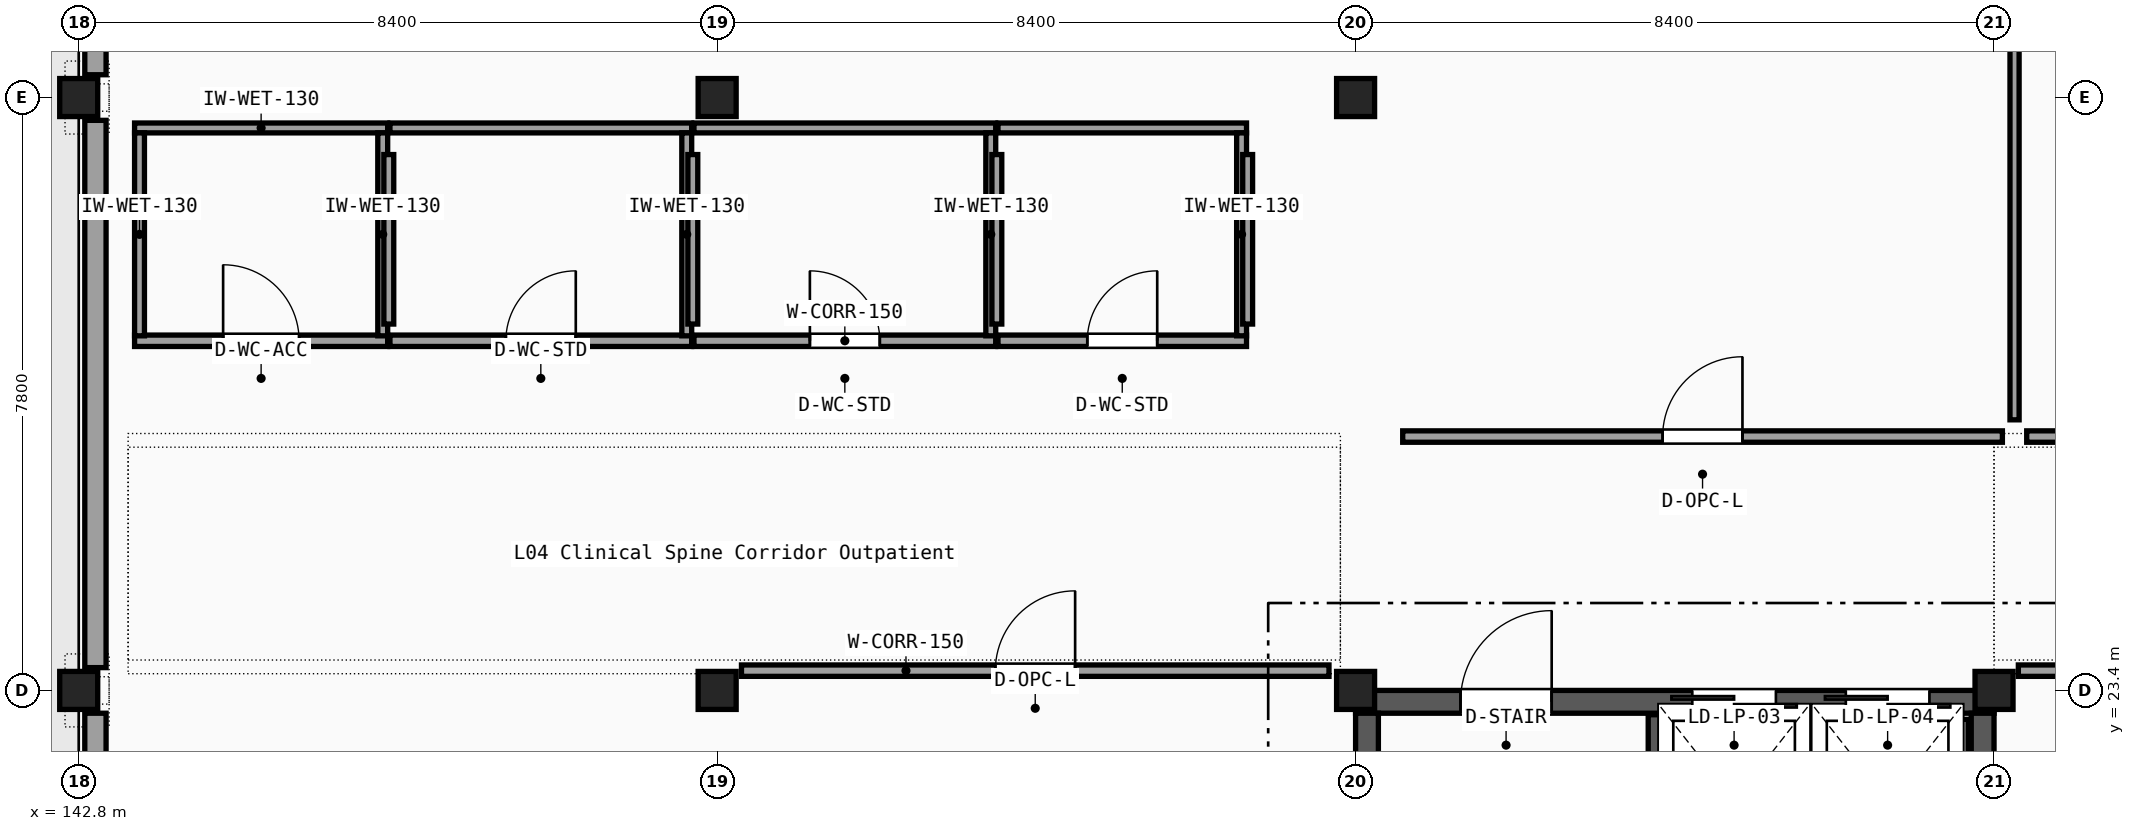
"""IFC4 building model, lengths in metres.
Left out: names, types, materials, properties, quantities, classifications, styles, units other than length and angle.
Written with IfcOpenShell. Run it as: python <this file> out.ifc"""

import sys

from ifc_helpers import new_model, si_unit, direction, frame, frame_2d, origin, origin_2d, place, context, subcontext, project, spatial, rectangle, extrude, element, fill, save


model = new_model("IFC4")
c1 = context("Model", 3, precision=1e-05, world=origin(), true_north=direction((0.0, 1.0)))
c2 = subcontext(c1, "Body", "Model", "MODEL_VIEW")
j1 = project(units=[si_unit("LENGTHUNIT", "METRE"), si_unit("PLANEANGLEUNIT", "RADIAN")], contexts=[c1])
p1 = place(None, origin())
s1 = spatial("IfcSite", under=j1, at=p1, CompositionType="ELEMENT")
p2 = place(p1, origin())
s2 = spatial("IfcBuilding", under=s1, at=p2, CompositionType="ELEMENT")
p3 = place(p2, frame((0.0, 0.0, 18.9)))
s3 = spatial("IfcBuildingStorey", under=s2, at=p3, CompositionType="ELEMENT", Elevation=18.9)
for number, where, z_axis, x_axis in (
    (1, (142.8, 23.4, 0.0), (0.0, 0.0, 1.0), (1.0, 0.0, 0.0)),
    (2, (142.8, 31.2, 0.0), (0.0, 0.0, 1.0), (1.0, 0.0, 0.0)),
    (3, (151.2, 23.4, 0.0), (0.0, 0.0, 1.0), (1.0, 0.0, 0.0)),
    (4, (151.2, 31.2, 0.0), (0.0, 0.0, 1.0), (1.0, 0.0, 0.0)),
    (5, (159.6, 23.4, 0.0), (0.0, 0.0, 1.0), (1.0, 0.0, 0.0)),
    (6, (159.6, 31.2, 0.0), (0.0, 0.0, 1.0), (1.0, 0.0, 0.0)),
    (7, (168.0, 23.4, 0.0), (0.0, 0.0, 1.0), (1.0, 0.0, 0.0)),
):
    element("IfcColumn", number, at=place(p3, frame(where, z_axis=z_axis, x_axis=x_axis)), inside=s3, PredefinedType="COLUMN", context=c2, shape_type="SweptSolid", body=[
        extrude(rectangle(XDim=0.5, YDim=0.5, at=origin_2d()), origin(), (0.0, 0.0, 1.0), 4.05),
    ])
p4 = place(p3, frame((143.02, 15.9, 0.0), z_axis=(0.0, 0.0, 1.0), x_axis=(0.0, 1.0, 0.0)))
e8 = element("IfcWall", 8, at=p4, inside=s3, PredefinedType="SOLIDWALL", context=c2, shape_type="SweptSolid", body=[
    extrude(rectangle(XDim=7.2, YDim=0.28, at=frame_2d((3.6, 0.0))), origin(), (0.0, 0.0, 1.0), 3.77),
])
p5 = place(p3, frame((143.02, 23.7, 0.0), z_axis=(0.0, 0.0, 1.0), x_axis=(0.0, 1.0, 0.0)))
e9 = element("IfcWall", 9, at=p5, inside=s3, PredefinedType="SOLIDWALL", context=c2, shape_type="SweptSolid", body=[
    extrude(rectangle(XDim=7.2, YDim=0.28, at=frame_2d((3.6, 0.0))), origin(), (0.0, 0.0, 1.0), 3.77),
])
p6 = place(p3, frame((143.02, 31.5, 0.0), z_axis=(0.0, 0.0, 1.0), x_axis=(0.0, 1.0, 0.0)))
e10 = element("IfcWall", 10, at=p6, inside=s3, PredefinedType="SOLIDWALL", context=c2, shape_type="SweptSolid", body=[
    extrude(rectangle(XDim=7.18, YDim=0.28, at=frame_2d((3.59, 0.0))), origin(), (0.0, 0.0, 1.0), 3.52),
])
p7 = place(p3, frame((159.6, 23.25, 0.0), z_axis=(0.0, 0.0, 1.0), x_axis=(1.0, 0.0, 0.0)))
e11 = element("IfcWall", 11, at=p7, inside=s3, PredefinedType="SHEAR", context=c2, shape_type="SweptSolid", body=[
    extrude(rectangle(XDim=8.4, YDim=0.3, at=frame_2d((4.2, 0.0))), origin(), (0.0, 0.0, 1.0), 3.8),
])
p8 = place(p7, frame((1.38, 0.0, 0.0)))
e12 = element("IfcOpeningElement", 12, at=p8, cuts=e11, PredefinedType="OPENING", context=c2, shape_type="SweptSolid", body=[
    extrude(rectangle(XDim=1.2, YDim=2.15, at=frame_2d((0.6, 1.075))), frame((0.0, 0.16, 0.0), z_axis=(0.0, -1.0, 0.0), x_axis=(1.0, 0.0, 0.0)), (0.0, 0.0, 1.0), 0.32),
])
p9 = place(p7, frame((4.43, 0.0, 0.0)))
e13 = element("IfcOpeningElement", 13, at=p9, cuts=e11, PredefinedType="OPENING", context=c2, shape_type="SweptSolid", body=[
    extrude(rectangle(XDim=1.1, YDim=2.15, at=frame_2d((0.55, 1.075))), frame((0.0, 0.16, 0.0), z_axis=(0.0, -1.0, 0.0), x_axis=(1.0, 0.0, 0.0)), (0.0, 0.0, 1.0), 0.32),
])
p10 = place(p7, frame((6.45, 0.0, 0.0)))
e14 = element("IfcOpeningElement", 14, at=p10, cuts=e11, PredefinedType="OPENING", context=c2, shape_type="SweptSolid", body=[
    extrude(rectangle(XDim=1.1, YDim=2.15, at=frame_2d((0.55, 1.075))), frame((0.0, 0.16, 0.0), z_axis=(0.0, -1.0, 0.0), x_axis=(1.0, 0.0, 0.0)), (0.0, 0.0, 1.0), 0.32),
])
for number, where, z_axis, x_axis in (
    (15, (159.75, 15.9, 0.0), (0.0, 0.0, 1.0), (0.0, 1.0, 0.0)),
    (16, (167.85, 15.9, 0.0), (0.0, 0.0, 1.0), (0.0, 1.0, 0.0)),
):
    element("IfcWall", number, at=place(p3, frame(where, z_axis=z_axis, x_axis=x_axis)), inside=s3, PredefinedType="SHEAR", context=c2, shape_type="SweptSolid", body=[
        extrude(rectangle(XDim=7.2, YDim=0.3, at=frame_2d((3.6, 0.0))), origin(), (0.0, 0.0, 1.0), 3.8),
    ])
p11 = place(p3, frame((163.55, 15.92, 0.0), z_axis=(0.0, 0.0, 1.0), x_axis=(0.0, 1.0, 0.0)))
e17 = element("IfcWall", 17, at=p11, inside=s3, PredefinedType="SHEAR", context=c2, shape_type="SweptSolid", body=[
    extrude(rectangle(XDim=7.16, YDim=0.2, at=frame_2d((3.58, 0.0))), origin(), (0.0, 0.0, 1.0), 3.8),
])
for number, where, z_axis, x_axis in (
    (18, (165.54, 20.88, 0.0), (0.0, 0.0, 1.0), (0.0, 1.0, 0.0)),
    (19, (167.56, 20.88, 0.0), (0.0, 0.0, 1.0), (0.0, 1.0, 0.0)),
):
    element("IfcWall", number, at=place(p3, frame(where, z_axis=z_axis, x_axis=x_axis)), inside=s3, PredefinedType="PARTITIONING", context=c2, shape_type="SweptSolid", body=[
        extrude(rectangle(XDim=2.14, YDim=0.2, at=frame_2d((1.07, 0.0))), origin(), (0.0, 0.0, 1.0), 3.44),
    ])
p12 = place(p3, frame((143.535, 28.0, 0.0), z_axis=(0.0, 0.0, 1.0), x_axis=(1.0, 0.0, 0.0)))
e20 = element("IfcWall", 20, at=p12, inside=s3, PredefinedType="PARTITIONING", context=c2, shape_type="SweptSolid", body=[
    extrude(rectangle(XDim=3.33, YDim=0.15, at=frame_2d((1.665, 0.0))), origin(), (0.0, 0.0, 1.0), 3.77),
])
p13 = place(p12, frame((1.165, 0.0, 0.0)))
e21 = element("IfcOpeningElement", 21, at=p13, cuts=e20, PredefinedType="OPENING", context=c2, shape_type="SweptSolid", body=[
    extrude(rectangle(XDim=1.0, YDim=2.15, at=frame_2d((0.5, 1.075))), frame((0.0, 0.085, 0.0), z_axis=(0.0, -1.0, 0.0), x_axis=(1.0, 0.0, 0.0)), (0.0, 0.0, 1.0), 0.17),
])
p14 = place(p3, frame((143.535, 30.8, 0.0), z_axis=(0.0, 0.0, 1.0), x_axis=(1.0, 0.0, 0.0)))
e22 = element("IfcWall", 22, at=p14, inside=s3, PredefinedType="PARTITIONING", context=c2, shape_type="SweptSolid", body=[
    extrude(rectangle(XDim=3.33, YDim=0.13, at=frame_2d((1.665, 0.0))), origin(), (0.0, 0.0, 1.0), 3.77),
])
for number, where, z_axis, x_axis in (
    (23, (143.6, 28.065, 0.0), (0.0, 0.0, 1.0), (0.0, 1.0, 0.0)),
    (24, (146.8, 28.065, 0.0), (0.0, 0.0, 1.0), (0.0, 1.0, 0.0)),
):
    element("IfcWall", number, at=place(p3, frame(where, z_axis=z_axis, x_axis=x_axis)), inside=s3, PredefinedType="PARTITIONING", context=c2, shape_type="SweptSolid", body=[
        extrude(rectangle(XDim=2.67, YDim=0.13, at=frame_2d((1.335, 0.0))), origin(), (0.0, 0.0, 1.0), 3.77),
    ])
p15 = place(p3, frame((146.88, 28.22, 0.0), z_axis=(0.0, 0.0, 1.0), x_axis=(0.0, 1.0, 0.0)))
e25 = element("IfcWall", 25, at=p15, inside=s3, PredefinedType="PARTITIONING", context=c2, shape_type="SweptSolid", body=[
    extrude(rectangle(XDim=2.23, YDim=0.13, at=frame_2d((1.115, 0.0))), origin(), (0.0, 0.0, 1.0), 3.77),
])
p16 = place(p3, frame((146.895, 28.0, 0.0), z_axis=(0.0, 0.0, 1.0), x_axis=(1.0, 0.0, 0.0)))
e26 = element("IfcWall", 26, at=p16, inside=s3, PredefinedType="PARTITIONING", context=c2, shape_type="SweptSolid", body=[
    extrude(rectangle(XDim=3.97, YDim=0.15, at=frame_2d((1.985, 0.0))), origin(), (0.0, 0.0, 1.0), 3.44),
])
p17 = place(p16, frame((1.525, 0.0, 0.0)))
e27 = element("IfcOpeningElement", 27, at=p17, cuts=e26, PredefinedType="OPENING", context=c2, shape_type="SweptSolid", body=[
    extrude(rectangle(XDim=0.92, YDim=2.15, at=frame_2d((0.46, 1.075))), frame((0.0, 0.085, 0.0), z_axis=(0.0, -1.0, 0.0), x_axis=(1.0, 0.0, 0.0)), (0.0, 0.0, 1.0), 0.17),
])
p18 = place(p3, frame((146.895, 30.8, 0.0), z_axis=(0.0, 0.0, 1.0), x_axis=(1.0, 0.0, 0.0)))
e28 = element("IfcWall", 28, at=p18, inside=s3, PredefinedType="PARTITIONING", context=c2, shape_type="SweptSolid", body=[
    extrude(rectangle(XDim=3.97, YDim=0.13, at=frame_2d((1.985, 0.0))), origin(), (0.0, 0.0, 1.0), 3.44),
])
p19 = place(p3, frame((150.8, 28.065, 0.0), z_axis=(0.0, 0.0, 1.0), x_axis=(0.0, 1.0, 0.0)))
e29 = element("IfcWall", 29, at=p19, inside=s3, PredefinedType="PARTITIONING", context=c2, shape_type="SweptSolid", body=[
    extrude(rectangle(XDim=2.67, YDim=0.13, at=frame_2d((1.335, 0.0))), origin(), (0.0, 0.0, 1.0), 3.44),
])
p20 = place(p3, frame((150.88, 28.22, 0.0), z_axis=(0.0, 0.0, 1.0), x_axis=(0.0, 1.0, 0.0)))
e30 = element("IfcWall", 30, at=p20, inside=s3, PredefinedType="PARTITIONING", context=c2, shape_type="SweptSolid", body=[
    extrude(rectangle(XDim=2.23, YDim=0.13, at=frame_2d((1.115, 0.0))), origin(), (0.0, 0.0, 1.0), 3.44),
])
p21 = place(p3, frame((150.895, 28.0, 0.0), z_axis=(0.0, 0.0, 1.0), x_axis=(1.0, 0.0, 0.0)))
e31 = element("IfcWall", 31, at=p21, inside=s3, PredefinedType="PARTITIONING", context=c2, shape_type="SweptSolid", body=[
    extrude(rectangle(XDim=3.97, YDim=0.15, at=frame_2d((1.985, 0.0))), origin(), (0.0, 0.0, 1.0), 3.44),
])
p22 = place(p21, frame((1.525, 0.0, 0.0)))
e32 = element("IfcOpeningElement", 32, at=p22, cuts=e31, PredefinedType="OPENING", context=c2, shape_type="SweptSolid", body=[
    extrude(rectangle(XDim=0.92, YDim=2.15, at=frame_2d((0.46, 1.075))), frame((0.0, 0.085, 0.0), z_axis=(0.0, -1.0, 0.0), x_axis=(1.0, 0.0, 0.0)), (0.0, 0.0, 1.0), 0.17),
])
p23 = place(p3, frame((150.895, 30.8, 0.0), z_axis=(0.0, 0.0, 1.0), x_axis=(1.0, 0.0, 0.0)))
e33 = element("IfcWall", 33, at=p23, inside=s3, PredefinedType="PARTITIONING", context=c2, shape_type="SweptSolid", body=[
    extrude(rectangle(XDim=3.97, YDim=0.13, at=frame_2d((1.985, 0.0))), origin(), (0.0, 0.0, 1.0), 3.44),
])
p24 = place(p3, frame((154.8, 28.065, 0.0), z_axis=(0.0, 0.0, 1.0), x_axis=(0.0, 1.0, 0.0)))
e34 = element("IfcWall", 34, at=p24, inside=s3, PredefinedType="PARTITIONING", context=c2, shape_type="SweptSolid", body=[
    extrude(rectangle(XDim=2.67, YDim=0.13, at=frame_2d((1.335, 0.0))), origin(), (0.0, 0.0, 1.0), 3.77),
])
p25 = place(p3, frame((154.88, 28.22, 0.0), z_axis=(0.0, 0.0, 1.0), x_axis=(0.0, 1.0, 0.0)))
e35 = element("IfcWall", 35, at=p25, inside=s3, PredefinedType="PARTITIONING", context=c2, shape_type="SweptSolid", body=[
    extrude(rectangle(XDim=2.23, YDim=0.13, at=frame_2d((1.115, 0.0))), origin(), (0.0, 0.0, 1.0), 3.77),
])
p26 = place(p3, frame((154.895, 28.0, 0.0), z_axis=(0.0, 0.0, 1.0), x_axis=(1.0, 0.0, 0.0)))
e36 = element("IfcWall", 36, at=p26, inside=s3, PredefinedType="PARTITIONING", context=c2, shape_type="SweptSolid", body=[
    extrude(rectangle(XDim=3.27, YDim=0.15, at=frame_2d((1.635, 0.0))), origin(), (0.0, 0.0, 1.0), 3.77),
])
p27 = place(p26, frame((1.175, 0.0, 0.0)))
e37 = element("IfcOpeningElement", 37, at=p27, cuts=e36, PredefinedType="OPENING", context=c2, shape_type="SweptSolid", body=[
    extrude(rectangle(XDim=0.92, YDim=2.15, at=frame_2d((0.46, 1.075))), frame((0.0, 0.085, 0.0), z_axis=(0.0, -1.0, 0.0), x_axis=(1.0, 0.0, 0.0)), (0.0, 0.0, 1.0), 0.17),
])
p28 = place(p3, frame((154.895, 30.8, 0.0), z_axis=(0.0, 0.0, 1.0), x_axis=(1.0, 0.0, 0.0)))
e38 = element("IfcWall", 38, at=p28, inside=s3, PredefinedType="PARTITIONING", context=c2, shape_type="SweptSolid", body=[
    extrude(rectangle(XDim=3.27, YDim=0.13, at=frame_2d((1.635, 0.0))), origin(), (0.0, 0.0, 1.0), 3.77),
])
p29 = place(p3, frame((158.1, 28.065, 0.0), z_axis=(0.0, 0.0, 1.0), x_axis=(0.0, 1.0, 0.0)))
e39 = element("IfcWall", 39, at=p29, inside=s3, PredefinedType="PARTITIONING", context=c2, shape_type="SweptSolid", body=[
    extrude(rectangle(XDim=2.67, YDim=0.13, at=frame_2d((1.335, 0.0))), origin(), (0.0, 0.0, 1.0), 3.77),
])
p30 = place(p3, frame((158.18, 28.22, 0.0), z_axis=(0.0, 0.0, 1.0), x_axis=(0.0, 1.0, 0.0)))
e40 = element("IfcWall", 40, at=p30, inside=s3, PredefinedType="PARTITIONING", context=c2, shape_type="SweptSolid", body=[
    extrude(rectangle(XDim=2.23, YDim=0.13, at=frame_2d((1.115, 0.0))), origin(), (0.0, 0.0, 1.0), 3.77),
])
p31 = place(p3, frame((151.52, 23.66, 0.0), z_axis=(0.0, 0.0, 1.0), x_axis=(1.0, 0.0, 0.0)))
e41 = element("IfcWall", 41, at=p31, inside=s3, PredefinedType="PARTITIONING", context=c2, shape_type="SweptSolid", body=[
    extrude(rectangle(XDim=7.73, YDim=0.15, at=frame_2d((3.865, 0.0))), origin(), (0.0, 0.0, 1.0), 3.44),
])
p32 = place(p31, frame((3.34, 0.0, 0.0)))
e42 = element("IfcOpeningElement", 42, at=p32, cuts=e41, PredefinedType="OPENING", context=c2, shape_type="SweptSolid", body=[
    extrude(rectangle(XDim=1.05, YDim=2.15, at=frame_2d((0.525, 1.075))), frame((0.0, 0.085, 0.0), z_axis=(0.0, -1.0, 0.0), x_axis=(1.0, 0.0, 0.0)), (0.0, 0.0, 1.0), 0.17),
])
p33 = place(p3, frame((168.32, 23.66, 0.0), z_axis=(0.0, 0.0, 1.0), x_axis=(1.0, 0.0, 0.0)))
e43 = element("IfcWall", 43, at=p33, inside=s3, PredefinedType="PARTITIONING", context=c2, shape_type="SweptSolid", body=[
    extrude(rectangle(XDim=7.9, YDim=0.15, at=frame_2d((3.95, 0.0))), origin(), (0.0, 0.0, 1.0), 3.44),
])
p34 = place(p33, frame((3.425, 0.0, 0.0)))
e44 = element("IfcOpeningElement", 44, at=p34, cuts=e43, PredefinedType="OPENING", context=c2, shape_type="SweptSolid", body=[
    extrude(rectangle(XDim=1.05, YDim=2.15, at=frame_2d((0.525, 1.075))), frame((0.0, 0.085, 0.0), z_axis=(0.0, -1.0, 0.0), x_axis=(1.0, 0.0, 0.0)), (0.0, 0.0, 1.0), 0.17),
])
p35 = place(p3, frame((160.22, 26.74, 0.0), z_axis=(0.0, 0.0, 1.0), x_axis=(1.0, 0.0, 0.0)))
e45 = element("IfcWall", 45, at=p35, inside=s3, PredefinedType="PARTITIONING", context=c2, shape_type="SweptSolid", body=[
    extrude(rectangle(XDim=7.89, YDim=0.15, at=frame_2d((3.945, 0.0))), origin(), (0.0, 0.0, 1.0), 3.77),
])
p36 = place(p35, frame((3.42, 0.0, 0.0)))
e46 = element("IfcOpeningElement", 46, at=p36, cuts=e45, PredefinedType="OPENING", context=c2, shape_type="SweptSolid", body=[
    extrude(rectangle(XDim=1.05, YDim=2.15, at=frame_2d((0.525, 1.075))), frame((0.0, 0.085, 0.0), z_axis=(0.0, -1.0, 0.0), x_axis=(1.0, 0.0, 0.0)), (0.0, 0.0, 1.0), 0.17),
])
p37 = place(p3, frame((168.27, 26.96, 0.0), z_axis=(0.0, 0.0, 1.0), x_axis=(0.0, 1.0, 0.0)))
e47 = element("IfcWall", 47, at=p37, inside=s3, PredefinedType="PARTITIONING", context=c2, shape_type="SweptSolid", body=[
    extrude(rectangle(XDim=11.35, YDim=0.12, at=frame_2d((5.675, 0.0))), origin(), (0.0, 0.0, 1.0), 3.77),
])
p38 = place(p3, frame((168.43, 26.74, 0.0), z_axis=(0.0, 0.0, 1.0), x_axis=(1.0, 0.0, 0.0)))
e48 = element("IfcWall", 48, at=p38, inside=s3, PredefinedType="PARTITIONING", context=c2, shape_type="SweptSolid", body=[
    extrude(rectangle(XDim=7.81, YDim=0.15, at=frame_2d((3.905, 0.0))), origin(), (0.0, 0.0, 1.0), 3.44),
])
p39 = place(p38, frame((3.28, 0.0, 0.0)))
e49 = element("IfcOpeningElement", 49, at=p39, cuts=e48, PredefinedType="OPENING", context=c2, shape_type="SweptSolid", body=[
    extrude(rectangle(XDim=1.25, YDim=2.2, at=frame_2d((0.625, 1.1))), frame((0.0, 0.085, 0.0), z_axis=(0.0, -1.0, 0.0), x_axis=(1.0, 0.0, 0.0)), (0.0, 0.0, 1.0), 0.17),
])
p40 = place(p8, origin())
e50 = element("IfcDoor", 50, at=p40, inside=s3, OperationType="SINGLE_SWING_RIGHT", PredefinedType="DOOR", context=c2, shape_type="SweptSolid", body=[
    extrude(rectangle(XDim=1.2, YDim=2.15, at=frame_2d((0.6, 1.075))), frame((0.0, 0.025, 0.0), z_axis=(0.0, -1.0, 0.0), x_axis=(1.0, 0.0, 0.0)), (0.0, 0.0, 1.0), 0.05),
])
fill(e12, e50)
p41 = place(p9, origin())
e51 = element("IfcDoor", 51, at=p41, inside=s3, OperationType="DOUBLE_DOOR_SLIDING", PredefinedType="DOOR", context=c2, shape_type="SweptSolid", body=[
    extrude(rectangle(XDim=1.1, YDim=2.15, at=frame_2d((0.55, 1.075))), frame((0.0, 0.025, 0.0), z_axis=(0.0, -1.0, 0.0), x_axis=(1.0, 0.0, 0.0)), (0.0, 0.0, 1.0), 0.05),
])
fill(e13, e51)
p42 = place(p10, origin())
e52 = element("IfcDoor", 52, at=p42, inside=s3, OperationType="DOUBLE_DOOR_SLIDING", PredefinedType="DOOR", context=c2, shape_type="SweptSolid", body=[
    extrude(rectangle(XDim=1.1, YDim=2.15, at=frame_2d((0.55, 1.075))), frame((0.0, 0.025, 0.0), z_axis=(0.0, -1.0, 0.0), x_axis=(1.0, 0.0, 0.0)), (0.0, 0.0, 1.0), 0.05),
])
fill(e14, e52)
p43 = place(p13, origin())
e53 = element("IfcDoor", 53, at=p43, inside=s3, OperationType="SINGLE_SWING_LEFT", PredefinedType="DOOR", context=c2, shape_type="SweptSolid", body=[
    extrude(rectangle(XDim=1.0, YDim=2.15, at=frame_2d((0.5, 1.075))), frame((0.0, 0.025, 0.0), z_axis=(0.0, -1.0, 0.0), x_axis=(1.0, 0.0, 0.0)), (0.0, 0.0, 1.0), 0.05),
])
fill(e21, e53)
p44 = place(p17, origin())
e54 = element("IfcDoor", 54, at=p44, inside=s3, OperationType="SINGLE_SWING_RIGHT", PredefinedType="DOOR", context=c2, shape_type="SweptSolid", body=[
    extrude(rectangle(XDim=0.92, YDim=2.15, at=frame_2d((0.46, 1.075))), frame((0.0, 0.025, 0.0), z_axis=(0.0, -1.0, 0.0), x_axis=(1.0, 0.0, 0.0)), (0.0, 0.0, 1.0), 0.05),
])
fill(e27, e54)
p45 = place(p22, origin())
e55 = element("IfcDoor", 55, at=p45, inside=s3, OperationType="SINGLE_SWING_LEFT", PredefinedType="DOOR", context=c2, shape_type="SweptSolid", body=[
    extrude(rectangle(XDim=0.92, YDim=2.15, at=frame_2d((0.46, 1.075))), frame((0.0, 0.025, 0.0), z_axis=(0.0, -1.0, 0.0), x_axis=(1.0, 0.0, 0.0)), (0.0, 0.0, 1.0), 0.05),
])
fill(e32, e55)
p46 = place(p27, origin())
e56 = element("IfcDoor", 56, at=p46, inside=s3, OperationType="SINGLE_SWING_RIGHT", PredefinedType="DOOR", context=c2, shape_type="SweptSolid", body=[
    extrude(rectangle(XDim=0.92, YDim=2.15, at=frame_2d((0.46, 1.075))), frame((0.0, 0.025, 0.0), z_axis=(0.0, -1.0, 0.0), x_axis=(1.0, 0.0, 0.0)), (0.0, 0.0, 1.0), 0.05),
])
fill(e37, e56)
p47 = place(p32, origin())
e57 = element("IfcDoor", 57, at=p47, inside=s3, OperationType="SINGLE_SWING_RIGHT", PredefinedType="DOOR", context=c2, shape_type="SweptSolid", body=[
    extrude(rectangle(XDim=1.05, YDim=2.15, at=frame_2d((0.525, 1.075))), frame((0.0, 0.025, 0.0), z_axis=(0.0, -1.0, 0.0), x_axis=(1.0, 0.0, 0.0)), (0.0, 0.0, 1.0), 0.05),
])
fill(e42, e57)
p48 = place(p36, origin())
e58 = element("IfcDoor", 58, at=p48, inside=s3, OperationType="SINGLE_SWING_RIGHT", PredefinedType="DOOR", context=c2, shape_type="SweptSolid", body=[
    extrude(rectangle(XDim=1.05, YDim=2.15, at=frame_2d((0.525, 1.075))), frame((0.0, 0.025, 0.0), z_axis=(0.0, -1.0, 0.0), x_axis=(1.0, 0.0, 0.0)), (0.0, 0.0, 1.0), 0.05),
])
fill(e46, e58)
save(model, sys.argv[1])
